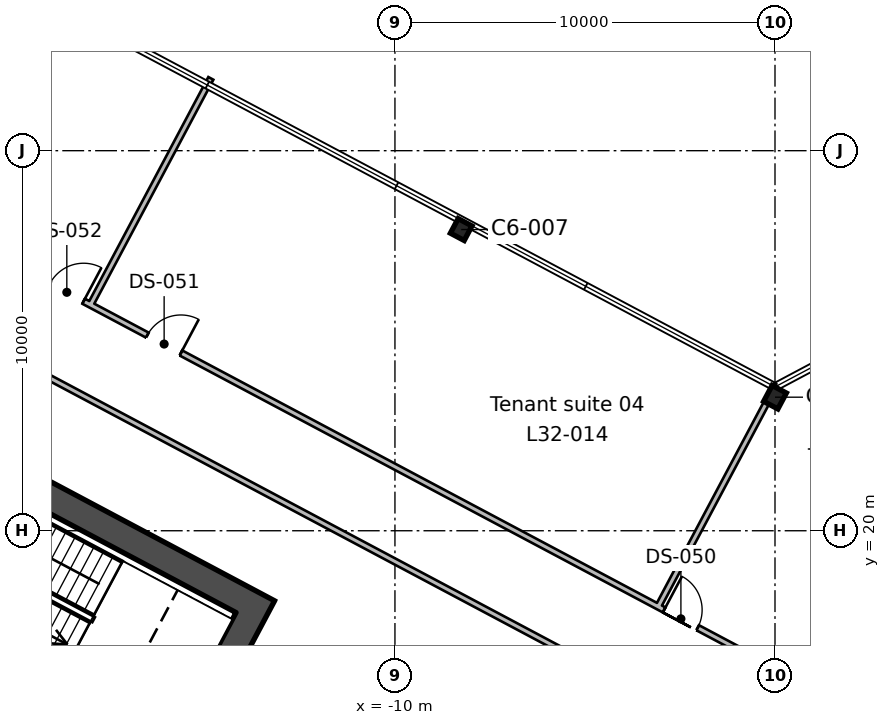
"""IFC4 building model, lengths in metres.
Left out: names, types, materials, properties, quantities, classifications, styles, units other than length and angle.
Written with IfcOpenShell. Run it as: python <this file> out.ifc"""

import sys

from ifc_helpers import new_model, si_unit, direction, frame, frame_2d, origin, origin_2d, place, context, subcontext, project, spatial, rectangle, i_section, extrude, element, fill, save


model = new_model("IFC4")
c1 = context("Model", 3, precision=1e-05, world=origin(), true_north=direction((0.0, 1.0)))
c2 = subcontext(c1, "Body", "Model", "MODEL_VIEW")
j1 = project(units=[si_unit("LENGTHUNIT", "METRE"), si_unit("PLANEANGLEUNIT", "RADIAN")], contexts=[c1])
p1 = place(None, origin())
s1 = spatial("IfcSite", under=j1, at=p1, CompositionType="ELEMENT")
p2 = place(p1, origin())
s2 = spatial("IfcBuilding", under=s1, at=p2, CompositionType="ELEMENT")
p3 = place(p2, frame((0.0, 0.0, 154.2)))
s3 = spatial("IfcBuildingStorey", under=s2, at=p3, CompositionType="ELEMENT", Elevation=154.2)
p4 = place(p3, frame((0.0, 23.514, 0.0), z_axis=(0.0, 0.0, 1.0), x_axis=(-0.882947592859, 0.469471562786, 0.0)))
e1 = element("IfcColumn", 1, at=p4, inside=s3, PredefinedType="COLUMN", context=c2, shape_type="SweptSolid", body=[
    extrude(i_section(OverallWidth=0.424, OverallDepth=0.475, WebThickness=0.048, FlangeThickness=0.077, FilletRadius=0.015, at=origin_2d()), origin(), (0.0, 0.0, 1.0), 4.0),
])
p5 = place(p3, frame((-8.257, 27.925, 0.0), z_axis=(0.0, 0.0, 1.0), x_axis=(-0.882947592859, 0.469471562786, 0.0)))
e2 = element("IfcColumn", 2, at=p5, inside=s3, PredefinedType="COLUMN", context=c2, shape_type="SweptSolid", body=[
    extrude(i_section(OverallWidth=0.412, OverallDepth=0.434, WebThickness=0.036, FlangeThickness=0.057, FilletRadius=0.015, at=origin_2d()), origin(), (0.0, 0.0, 1.0), 4.0),
])
p6 = place(p3, frame((-13.498, 18.333, 0.0), z_axis=(0.0, 0.0, 1.0), x_axis=(-0.469469918705, -0.88294846703, 0.0)))
e3 = element("IfcWall", 3, at=p6, inside=s3, PredefinedType="SHEAR", context=c2, shape_type="SweptSolid", body=[
    extrude(rectangle(XDim=19.7, YDim=0.75, at=frame_2d((9.85, 0.0))), origin(), (0.0, 0.0, 1.0), 4.0),
])
p7 = place(p6, frame((6.85, 0.0, 0.0)))
e4 = element("IfcOpeningElement", 4, at=p7, cuts=e3, PredefinedType="OPENING", context=c2, shape_type="SweptSolid", body=[
    extrude(rectangle(XDim=2.4, YDim=2.4, at=frame_2d((1.2, 1.2))), frame((0.0, 0.385, 0.0), z_axis=(0.0, -1.0, 0.0), x_axis=(1.0, 0.0, 0.0)), (0.0, 0.0, 1.0), 0.77),
])
p8 = place(p3, frame((-14.005, 18.178, 0.0), z_axis=(0.0, 0.0, 1.0), x_axis=(-0.88295010195, 0.469466843842, 0.0)))
e5 = element("IfcWall", 5, at=p8, inside=s3, PredefinedType="SHEAR", context=c2, shape_type="SweptSolid", body=[
    extrude(rectangle(XDim=20.2, YDim=0.75, at=frame_2d((10.1, 0.0))), origin(), (0.0, 0.0, 1.0), 4.0),
])
p9 = place(p3, frame((-15.942, 14.536, 0.0), z_axis=(0.0, 0.0, 1.0), x_axis=(-0.882946947542, 0.469472776449, 0.0)))
e6 = element("IfcWall", 6, at=p9, inside=s3, PredefinedType="SHEAR", context=c2, shape_type="SweptSolid", body=[
    extrude(rectangle(XDim=8.0, YDim=0.2, at=frame_2d((4.0, 0.0))), origin(), (0.0, 0.0, 1.0), 4.0),
])
p10 = place(p3, frame((-16.529, 13.432, 0.0), z_axis=(0.0, 0.0, 1.0), x_axis=(-0.88295287151, 0.469461634952, 0.0)))
e7 = element("IfcWall", 7, at=p10, inside=s3, PredefinedType="SHEAR", context=c2, shape_type="SweptSolid", body=[
    extrude(rectangle(XDim=8.0, YDim=0.2, at=frame_2d((4.0, 0.0))), origin(), (0.0, 0.0, 1.0), 4.0),
])
p11 = place(p3, frame((-32.964, 31.402, 0.0), z_axis=(0.0, 0.0, 1.0), x_axis=(0.88293807027, -0.469489471733, 0.0)))
e8 = element("IfcWall", 8, at=p11, inside=s3, PredefinedType="PARTITIONING", context=c2, shape_type="SweptSolid", body=[
    extrude(rectangle(XDim=34.425, YDim=0.15, at=frame_2d((17.212, 0.0))), origin(), (0.0, 0.0, 1.0), 3.64),
])
p12 = place(p3, frame((-32.187, 33.48, 0.0), z_axis=(0.0, 0.0, 1.0), x_axis=(0.88294900327, -0.469468910179, 0.0)))
e9 = element("IfcWall", 9, at=p12, inside=s3, PredefinedType="PARTITIONING", context=c2, shape_type="SweptSolid", body=[
    extrude(rectangle(XDim=36.454, YDim=0.15, at=frame_2d((18.227, 0.0))), origin(), (0.0, 0.0, 1.0), 3.64),
])
p13 = place(p12, frame((33.15, 0.0, 0.0)))
e10 = element("IfcOpeningElement", 10, at=p13, cuts=e9, PredefinedType="OPENING", context=c2, shape_type="SweptSolid", body=[
    extrude(rectangle(XDim=1.0, YDim=2.1, at=frame_2d((0.5, 1.05))), frame((0.0, 0.085, 0.0), z_axis=(0.0, -1.0, 0.0), x_axis=(1.0, 0.0, 0.0)), (0.0, 0.0, 1.0), 0.17),
])
p14 = place(p12, frame((17.75, 0.0, 0.0)))
e11 = element("IfcOpeningElement", 11, at=p14, cuts=e9, PredefinedType="OPENING", context=c2, shape_type="SweptSolid", body=[
    extrude(rectangle(XDim=1.0, YDim=2.1, at=frame_2d((0.5, 1.05))), frame((0.0, 0.085, 0.0), z_axis=(0.0, -1.0, 0.0), x_axis=(1.0, 0.0, 0.0)), (0.0, 0.0, 1.0), 0.17),
])
p15 = place(p12, frame((14.85, 0.0, 0.0)))
e12 = element("IfcOpeningElement", 12, at=p15, cuts=e9, PredefinedType="OPENING", context=c2, shape_type="SweptSolid", body=[
    extrude(rectangle(XDim=1.0, YDim=2.1, at=frame_2d((0.5, 1.05))), frame((0.0, 0.085, 0.0), z_axis=(0.0, -1.0, 0.0), x_axis=(1.0, 0.0, 0.0)), (0.0, 0.0, 1.0), 0.17),
])
p16 = place(p12, frame((3.55, 0.0, 0.0)))
e13 = element("IfcOpeningElement", 13, at=p16, cuts=e9, PredefinedType="OPENING", context=c2, shape_type="SweptSolid", body=[
    extrude(rectangle(XDim=1.0, YDim=2.1, at=frame_2d((0.5, 1.05))), frame((0.0, 0.085, 0.0), z_axis=(0.0, -1.0, 0.0), x_axis=(1.0, 0.0, 0.0)), (0.0, 0.0, 1.0), 0.17),
])
p17 = place(p3, frame((0.0, 16.366, 0.0), z_axis=(0.0, 0.0, 1.0), x_axis=(0.882949964187, 0.469467102939, 0.0)))
e14 = element("IfcWall", 14, at=p17, inside=s3, PredefinedType="PARTITIONING", context=c2, shape_type="SweptSolid", body=[
    extrude(rectangle(XDim=18.542, YDim=0.15, at=frame_2d((9.271, 0.0))), origin(), (0.0, 0.0, 1.0), 3.64),
])
p18 = place(p3, frame((-14.844, 31.903, 0.0), z_axis=(0.0, 0.0, 1.0), x_axis=(-0.469356207225, -0.883008918833, 0.0)))
e15 = element("IfcWall", 15, at=p18, inside=s3, PredefinedType="PARTITIONING", context=c2, shape_type="SweptSolid", body=[
    extrude(rectangle(XDim=6.75, YDim=0.15, at=frame_2d((3.375, 0.0))), origin(), (0.0, 0.0, 1.0), 3.64),
])
p19 = place(p3, frame((-0.224, 23.364, 0.0), z_axis=(0.0, 0.0, 1.0), x_axis=(-0.46937563441, -0.882998592197, 0.0)))
e16 = element("IfcWall", 16, at=p19, inside=s3, PredefinedType="PARTITIONING", context=c2, shape_type="SweptSolid", body=[
    extrude(rectangle(XDim=6.074, YDim=0.15, at=frame_2d((3.037, 0.0))), origin(), (0.0, 0.0, 1.0), 3.64),
])
p20 = place(p3, frame((0.0, 13.874, 0.0), z_axis=(0.0, 0.0, 1.0), x_axis=(0.882942852858, 0.469480477322, 0.0)))
e17 = element("IfcWall", 17, at=p20, inside=s3, PredefinedType="PARTITIONING", context=c2, shape_type="SweptSolid", body=[
    extrude(rectangle(XDim=40.737, YDim=0.15, at=frame_2d((20.368, 0.0))), origin(), (0.0, 0.0, 1.0), 3.64),
])
p21 = place(p20, frame((5.45, 0.0, 0.0)))
e18 = element("IfcOpeningElement", 18, at=p21, cuts=e17, PredefinedType="OPENING", context=c2, shape_type="SweptSolid", body=[
    extrude(rectangle(XDim=1.8, YDim=2.1, at=frame_2d((0.9, 1.05))), frame((0.0, 0.085, 0.0), z_axis=(0.0, -1.0, 0.0), x_axis=(1.0, 0.0, 0.0)), (0.0, 0.0, 1.0), 0.17),
])
p22 = place(p13, origin())
e19 = element("IfcDoor", 19, at=p22, inside=s3, OperationType="SINGLE_SWING_LEFT", PredefinedType="DOOR", context=c2, shape_type="SweptSolid", body=[
    extrude(rectangle(XDim=1.0, YDim=2.1, at=frame_2d((0.5, 1.05))), frame((0.0, 0.025, 0.0), z_axis=(0.0, -1.0, 0.0), x_axis=(1.0, 0.0, 0.0)), (0.0, 0.0, 1.0), 0.05),
])
fill(e10, e19)
p23 = place(p14, origin())
e20 = element("IfcDoor", 20, at=p23, inside=s3, OperationType="SINGLE_SWING_RIGHT", PredefinedType="DOOR", context=c2, shape_type="SweptSolid", body=[
    extrude(rectangle(XDim=1.0, YDim=2.1, at=frame_2d((0.5, 1.05))), frame((0.0, 0.025, 0.0), z_axis=(0.0, -1.0, 0.0), x_axis=(1.0, 0.0, 0.0)), (0.0, 0.0, 1.0), 0.05),
])
fill(e11, e20)
p24 = place(p15, origin())
e21 = element("IfcDoor", 21, at=p24, inside=s3, OperationType="SINGLE_SWING_RIGHT", PredefinedType="DOOR", context=c2, shape_type="SweptSolid", body=[
    extrude(rectangle(XDim=1.0, YDim=2.1, at=frame_2d((0.5, 1.05))), frame((0.0, 0.025, 0.0), z_axis=(0.0, -1.0, 0.0), x_axis=(1.0, 0.0, 0.0)), (0.0, 0.0, 1.0), 0.05),
])
fill(e12, e21)
save(model, sys.argv[1])
